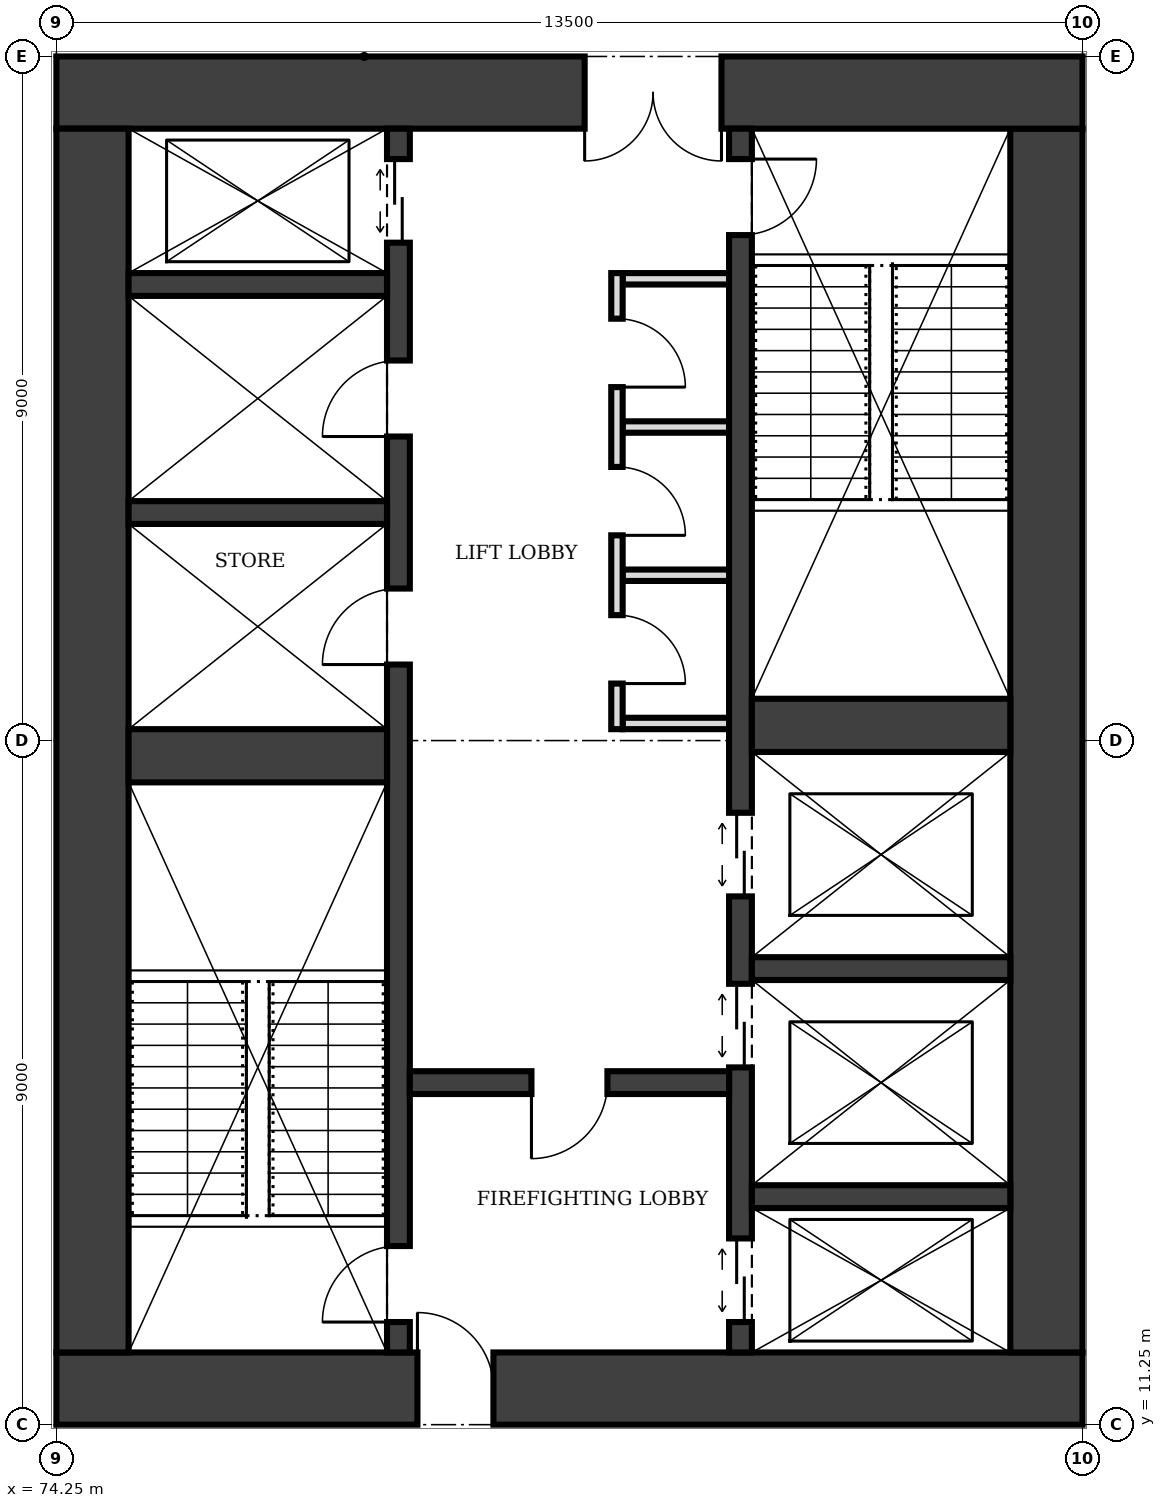
"""IFC4 building model, lengths in metres.
Left out: names, types, materials, properties, quantities, classifications, styles, units other than length and angle.
Written with IfcOpenShell. Run it as: python <this file> out.ifc"""

import sys

from ifc_helpers import new_model, si_unit, direction, frame, frame_2d, origin, place, context, subcontext, project, spatial, rectangle, extrude, element, fill, save


model = new_model("IFC4")
c1 = context("Model", 3, precision=1e-05, world=origin(), true_north=direction((0.0, 1.0)))
c2 = subcontext(c1, "Body", "Model", "MODEL_VIEW")
j1 = project(units=[si_unit("LENGTHUNIT", "METRE"), si_unit("PLANEANGLEUNIT", "RADIAN")], contexts=[c1])
p1 = place(None, origin())
s1 = spatial("IfcSite", under=j1, at=p1, CompositionType="ELEMENT")
p2 = place(p1, origin())
s2 = spatial("IfcBuilding", under=s1, at=p2, CompositionType="ELEMENT")
p3 = place(p2, frame((0.0, 0.0, 121.0)))
s3 = spatial("IfcBuildingStorey", under=s2, at=p3, CompositionType="ELEMENT", Elevation=121.0)
p4 = place(p3, frame((74.25, 11.725, 0.0), z_axis=(0.0, 0.0, 1.0), x_axis=(1.0, 0.0, 0.0)))
e1 = element("IfcWall", 1, at=p4, inside=s3, PredefinedType="SHEAR", context=c2, shape_type="SweptSolid", body=[
    extrude(rectangle(XDim=13.5, YDim=0.95, at=frame_2d((6.75, 0.0))), origin(), (0.0, 0.0, 1.0), 4.0),
])
p5 = place(p4, frame((4.75, 0.0, 0.0)))
e2 = element("IfcOpeningElement", 2, at=p5, cuts=e1, PredefinedType="OPENING", context=c2, shape_type="SweptSolid", body=[
    extrude(rectangle(XDim=1.0, YDim=2.1, at=frame_2d((0.5, 1.05))), frame((0.0, 0.485, 0.0), z_axis=(0.0, -1.0, 0.0), x_axis=(1.0, 0.0, 0.0)), (0.0, 0.0, 1.0), 0.97),
])
p6 = place(p3, frame((87.275, 12.2, 0.0), z_axis=(0.0, 0.0, 1.0), x_axis=(0.0, 1.0, 0.0)))
e3 = element("IfcWall", 3, at=p6, inside=s3, PredefinedType="SHEAR", context=c2, shape_type="SweptSolid", body=[
    extrude(rectangle(XDim=16.1, YDim=0.95, at=frame_2d((8.05, 0.0))), origin(), (0.0, 0.0, 1.0), 4.0),
])
p7 = place(p3, frame((87.75, 28.775, 0.0), z_axis=(0.0, 0.0, 1.0), x_axis=(-1.0, 0.0, 0.0)))
e4 = element("IfcWall", 4, at=p7, inside=s3, PredefinedType="SHEAR", context=c2, shape_type="SweptSolid", body=[
    extrude(rectangle(XDim=13.5, YDim=0.95, at=frame_2d((6.75, 0.0))), origin(), (0.0, 0.0, 1.0), 4.0),
])
p8 = place(p7, frame((4.75, 0.0, 0.0)))
e5 = element("IfcOpeningElement", 5, at=p8, cuts=e4, PredefinedType="OPENING", context=c2, shape_type="SweptSolid", body=[
    extrude(rectangle(XDim=1.8, YDim=2.1, at=frame_2d((0.9, 1.05))), frame((0.0, 0.485, 0.0), z_axis=(0.0, -1.0, 0.0), x_axis=(1.0, 0.0, 0.0)), (0.0, 0.0, 1.0), 0.97),
])
p9 = place(p3, frame((74.725, 28.3, 0.0), z_axis=(0.0, 0.0, 1.0), x_axis=(0.0, -1.0, 0.0)))
e6 = element("IfcWall", 6, at=p9, inside=s3, PredefinedType="SHEAR", context=c2, shape_type="SweptSolid", body=[
    extrude(rectangle(XDim=16.1, YDim=0.95, at=frame_2d((8.05, 0.0))), origin(), (0.0, 0.0, 1.0), 4.0),
])
p10 = place(p3, frame((78.75, 12.2, 0.0), z_axis=(0.0, 0.0, 1.0), x_axis=(0.0, 1.0, 0.0)))
e7 = element("IfcWall", 7, at=p10, inside=s3, PredefinedType="SHEAR", context=c2, shape_type="SweptSolid", body=[
    extrude(rectangle(XDim=16.1, YDim=0.3, at=frame_2d((8.05, 0.0))), origin(), (0.0, 0.0, 1.0), 4.0),
])
p11 = place(p10, frame((0.4, 0.0, 0.0)))
e8 = element("IfcOpeningElement", 8, at=p11, cuts=e7, PredefinedType="OPENING", context=c2, shape_type="SweptSolid", body=[
    extrude(rectangle(XDim=1.0, YDim=2.1, at=frame_2d((0.5, 1.05))), frame((0.0, 0.16, 0.0), z_axis=(0.0, -1.0, 0.0), x_axis=(1.0, 0.0, 0.0)), (0.0, 0.0, 1.0), 0.32),
])
p12 = place(p10, frame((14.6, 0.0, 0.0)))
e9 = element("IfcOpeningElement", 9, at=p12, cuts=e7, PredefinedType="OPENING", context=c2, shape_type="SweptSolid", body=[
    extrude(rectangle(XDim=1.1, YDim=2.1, at=frame_2d((0.55, 1.05))), frame((0.0, 0.16, 0.0), z_axis=(0.0, -1.0, 0.0), x_axis=(1.0, 0.0, 0.0)), (0.0, 0.0, 1.0), 0.32),
])
p13 = place(p10, frame((9.05, 0.0, 0.0)))
e10 = element("IfcOpeningElement", 10, at=p13, cuts=e7, PredefinedType="OPENING", context=c2, shape_type="SweptSolid", body=[
    extrude(rectangle(XDim=1.0, YDim=2.1, at=frame_2d((0.5, 1.05))), frame((0.0, 0.16, 0.0), z_axis=(0.0, -1.0, 0.0), x_axis=(1.0, 0.0, 0.0)), (0.0, 0.0, 1.0), 0.32),
])
p14 = place(p10, frame((12.05, 0.0, 0.0)))
e11 = element("IfcOpeningElement", 11, at=p14, cuts=e7, PredefinedType="OPENING", context=c2, shape_type="SweptSolid", body=[
    extrude(rectangle(XDim=1.0, YDim=2.1, at=frame_2d((0.5, 1.05))), frame((0.0, 0.16, 0.0), z_axis=(0.0, -1.0, 0.0), x_axis=(1.0, 0.0, 0.0)), (0.0, 0.0, 1.0), 0.32),
])
p15 = place(p3, frame((83.25, 12.2, 0.0), z_axis=(0.0, 0.0, 1.0), x_axis=(0.0, 1.0, 0.0)))
e12 = element("IfcWall", 12, at=p15, inside=s3, PredefinedType="SHEAR", context=c2, shape_type="SweptSolid", body=[
    extrude(rectangle(XDim=16.1, YDim=0.3, at=frame_2d((8.05, 0.0))), origin(), (0.0, 0.0, 1.0), 4.0),
])
p16 = place(p15, frame((14.7, 0.0, 0.0)))
e13 = element("IfcOpeningElement", 13, at=p16, cuts=e12, PredefinedType="OPENING", context=c2, shape_type="SweptSolid", body=[
    extrude(rectangle(XDim=1.0, YDim=2.1, at=frame_2d((0.5, 1.05))), frame((0.0, 0.16, 0.0), z_axis=(0.0, -1.0, 0.0), x_axis=(1.0, 0.0, 0.0)), (0.0, 0.0, 1.0), 0.32),
])
p17 = place(p15, frame((0.4, 0.0, 0.0)))
e14 = element("IfcOpeningElement", 14, at=p17, cuts=e12, PredefinedType="OPENING", context=c2, shape_type="SweptSolid", body=[
    extrude(rectangle(XDim=1.1, YDim=2.1, at=frame_2d((0.55, 1.05))), frame((0.0, 0.16, 0.0), z_axis=(0.0, -1.0, 0.0), x_axis=(1.0, 0.0, 0.0)), (0.0, 0.0, 1.0), 0.32),
])
p18 = place(p15, frame((3.75, 0.0, 0.0)))
e15 = element("IfcOpeningElement", 15, at=p18, cuts=e12, PredefinedType="OPENING", context=c2, shape_type="SweptSolid", body=[
    extrude(rectangle(XDim=1.1, YDim=2.1, at=frame_2d((0.55, 1.05))), frame((0.0, 0.16, 0.0), z_axis=(0.0, -1.0, 0.0), x_axis=(1.0, 0.0, 0.0)), (0.0, 0.0, 1.0), 0.32),
])
p19 = place(p15, frame((6.0, 0.0, 0.0)))
e16 = element("IfcOpeningElement", 16, at=p19, cuts=e12, PredefinedType="OPENING", context=c2, shape_type="SweptSolid", body=[
    extrude(rectangle(XDim=1.1, YDim=2.1, at=frame_2d((0.55, 1.05))), frame((0.0, 0.16, 0.0), z_axis=(0.0, -1.0, 0.0), x_axis=(1.0, 0.0, 0.0)), (0.0, 0.0, 1.0), 0.32),
])
p20 = place(p3, frame((75.2, 20.05, 0.0), z_axis=(0.0, 0.0, 1.0), x_axis=(1.0, 0.0, 0.0)))
e17 = element("IfcWall", 17, at=p20, inside=s3, PredefinedType="SHEAR", context=c2, shape_type="SweptSolid", body=[
    extrude(rectangle(XDim=3.4, YDim=0.7, at=frame_2d((1.7, 0.0))), origin(), (0.0, 0.0, 1.0), 4.0),
])
p21 = place(p3, frame((78.9, 15.75, 0.0), z_axis=(0.0, 0.0, 1.0), x_axis=(1.0, 0.0, 0.0)))
e18 = element("IfcWall", 18, at=p21, inside=s3, PredefinedType="SHEAR", context=c2, shape_type="SweptSolid", body=[
    extrude(rectangle(XDim=4.2, YDim=0.3, at=frame_2d((2.1, 0.0))), origin(), (0.0, 0.0, 1.0), 4.0),
])
p22 = place(p21, frame((1.6, 0.0, 0.0)))
e19 = element("IfcOpeningElement", 19, at=p22, cuts=e18, PredefinedType="OPENING", context=c2, shape_type="SweptSolid", body=[
    extrude(rectangle(XDim=1.0, YDim=2.1, at=frame_2d((0.5, 1.05))), frame((0.0, 0.16, 0.0), z_axis=(0.0, -1.0, 0.0), x_axis=(1.0, 0.0, 0.0)), (0.0, 0.0, 1.0), 0.32),
])
for number, where, z_axis, x_axis in (
    (20, (83.4, 14.25, 0.0), (0.0, 0.0, 1.0), (1.0, 0.0, 0.0)),
    (21, (83.4, 17.25, 0.0), (0.0, 0.0, 1.0), (1.0, 0.0, 0.0)),
):
    element("IfcWall", number, at=place(p3, frame(where, z_axis=z_axis, x_axis=x_axis)), inside=s3, PredefinedType="SHEAR", context=c2, shape_type="SweptSolid", body=[
        extrude(rectangle(XDim=3.4, YDim=0.3, at=frame_2d((1.7, 0.0))), origin(), (0.0, 0.0, 1.0), 4.0),
    ])
p23 = place(p3, frame((83.4, 20.45, 0.0), z_axis=(0.0, 0.0, 1.0), x_axis=(1.0, 0.0, 0.0)))
e22 = element("IfcWall", 22, at=p23, inside=s3, PredefinedType="SHEAR", context=c2, shape_type="SweptSolid", body=[
    extrude(rectangle(XDim=3.4, YDim=0.7, at=frame_2d((1.7, 0.0))), origin(), (0.0, 0.0, 1.0), 4.0),
])
for number, where, z_axis, x_axis in (
    (23, (75.2, 23.25, 0.0), (0.0, 0.0, 1.0), (1.0, 0.0, 0.0)),
    (24, (75.2, 26.25, 0.0), (0.0, 0.0, 1.0), (1.0, 0.0, 0.0)),
):
    element("IfcWall", number, at=place(p3, frame(where, z_axis=z_axis, x_axis=x_axis)), inside=s3, PredefinedType="SHEAR", context=c2, shape_type="SweptSolid", body=[
        extrude(rectangle(XDim=3.4, YDim=0.3, at=frame_2d((1.7, 0.0))), origin(), (0.0, 0.0, 1.0), 4.0),
    ])
p24 = place(p3, frame((81.625, 20.4, 0.0), z_axis=(0.0, 0.0, 1.0), x_axis=(0.0, 1.0, 0.0)))
e25 = element("IfcWall", 25, at=p24, inside=s3, PredefinedType="PARTITIONING", context=c2, shape_type="SweptSolid", body=[
    extrude(rectangle(XDim=6.0, YDim=0.15, at=frame_2d((3.0, 0.0))), origin(), (0.0, 0.0, 1.0), 3.75),
])
p25 = place(p24, frame((0.6, 0.0, 0.0)))
e26 = element("IfcOpeningElement", 26, at=p25, cuts=e25, PredefinedType="OPENING", context=c2, shape_type="SweptSolid", body=[
    extrude(rectangle(XDim=0.9, YDim=2.1, at=frame_2d((0.45, 1.05))), frame((0.0, 0.085, 0.0), z_axis=(0.0, -1.0, 0.0), x_axis=(1.0, 0.0, 0.0)), (0.0, 0.0, 1.0), 0.17),
])
p26 = place(p24, frame((2.55, 0.0, 0.0)))
e27 = element("IfcOpeningElement", 27, at=p26, cuts=e25, PredefinedType="OPENING", context=c2, shape_type="SweptSolid", body=[
    extrude(rectangle(XDim=0.9, YDim=2.1, at=frame_2d((0.45, 1.05))), frame((0.0, 0.085, 0.0), z_axis=(0.0, -1.0, 0.0), x_axis=(1.0, 0.0, 0.0)), (0.0, 0.0, 1.0), 0.17),
])
p27 = place(p24, frame((4.5, 0.0, 0.0)))
e28 = element("IfcOpeningElement", 28, at=p27, cuts=e25, PredefinedType="OPENING", context=c2, shape_type="SweptSolid", body=[
    extrude(rectangle(XDim=0.9, YDim=2.1, at=frame_2d((0.45, 1.05))), frame((0.0, 0.085, 0.0), z_axis=(0.0, -1.0, 0.0), x_axis=(1.0, 0.0, 0.0)), (0.0, 0.0, 1.0), 0.17),
])
for number, where, z_axis, x_axis in (
    (29, (81.7, 20.475, 0.0), (0.0, 0.0, 1.0), (1.0, 0.0, 0.0)),
    (30, (81.7, 22.425, 0.0), (0.0, 0.0, 1.0), (1.0, 0.0, 0.0)),
    (31, (81.7, 24.375, 0.0), (0.0, 0.0, 1.0), (1.0, 0.0, 0.0)),
    (32, (81.7, 26.325, 0.0), (0.0, 0.0, 1.0), (1.0, 0.0, 0.0)),
):
    element("IfcWall", number, at=place(p3, frame(where, z_axis=z_axis, x_axis=x_axis)), inside=s3, PredefinedType="PARTITIONING", context=c2, shape_type="SweptSolid", body=[
        extrude(rectangle(XDim=1.4, YDim=0.15, at=frame_2d((0.7, 0.0))), origin(), (0.0, 0.0, 1.0), 3.75),
    ])
p28 = place(p5, origin())
e33 = element("IfcDoor", 33, at=p28, inside=s3, OperationType="SINGLE_SWING_LEFT", PredefinedType="DOOR", context=c2, shape_type="SweptSolid", body=[
    extrude(rectangle(XDim=1.0, YDim=2.1, at=frame_2d((0.5, 1.05))), frame((0.0, 0.025, 0.0), z_axis=(0.0, -1.0, 0.0), x_axis=(1.0, 0.0, 0.0)), (0.0, 0.0, 1.0), 0.05),
])
fill(e2, e33)
p29 = place(p8, origin())
e34 = element("IfcDoor", 34, at=p29, inside=s3, OperationType="DOUBLE_DOOR_SINGLE_SWING", PredefinedType="DOOR", context=c2, shape_type="SweptSolid", body=[
    extrude(rectangle(XDim=1.8, YDim=2.1, at=frame_2d((0.9, 1.05))), frame((0.0, 0.025, 0.0), z_axis=(0.0, -1.0, 0.0), x_axis=(1.0, 0.0, 0.0)), (0.0, 0.0, 1.0), 0.05),
])
fill(e5, e34)
p30 = place(p22, frame((1.0, 0.0, 0.0), z_axis=(0.0, 0.0, 1.0), x_axis=(-1.0, 0.0, 0.0)))
e35 = element("IfcDoor", 35, at=p30, inside=s3, OperationType="SINGLE_SWING_RIGHT", PredefinedType="DOOR", context=c2, shape_type="SweptSolid", body=[
    extrude(rectangle(XDim=1.0, YDim=2.1, at=frame_2d((0.5, 1.05))), frame((0.0, 0.025, 0.0), z_axis=(0.0, -1.0, 0.0), x_axis=(1.0, 0.0, 0.0)), (0.0, 0.0, 1.0), 0.05),
])
fill(e19, e35)
p31 = place(p11, origin())
e36 = element("IfcDoor", 36, at=p31, inside=s3, OperationType="SINGLE_SWING_LEFT", PredefinedType="DOOR", context=c2, shape_type="SweptSolid", body=[
    extrude(rectangle(XDim=1.0, YDim=2.1, at=frame_2d((0.5, 1.05))), frame((0.0, 0.025, 0.0), z_axis=(0.0, -1.0, 0.0), x_axis=(1.0, 0.0, 0.0)), (0.0, 0.0, 1.0), 0.05),
])
fill(e8, e36)
p32 = place(p16, frame((1.0, 0.0, 0.0), z_axis=(0.0, 0.0, 1.0), x_axis=(-1.0, 0.0, 0.0)))
e37 = element("IfcDoor", 37, at=p32, inside=s3, OperationType="SINGLE_SWING_LEFT", PredefinedType="DOOR", context=c2, shape_type="SweptSolid", body=[
    extrude(rectangle(XDim=1.0, YDim=2.1, at=frame_2d((0.5, 1.05))), frame((0.0, 0.025, 0.0), z_axis=(0.0, -1.0, 0.0), x_axis=(1.0, 0.0, 0.0)), (0.0, 0.0, 1.0), 0.05),
])
fill(e13, e37)
p33 = place(p17, origin())
e38 = element("IfcDoor", 38, at=p33, inside=s3, OperationType="DOUBLE_DOOR_SLIDING", PredefinedType="DOOR", context=c2, shape_type="SweptSolid", body=[
    extrude(rectangle(XDim=1.1, YDim=2.1, at=frame_2d((0.55, 1.05))), frame((0.0, 0.025, 0.0), z_axis=(0.0, -1.0, 0.0), x_axis=(1.0, 0.0, 0.0)), (0.0, 0.0, 1.0), 0.05),
])
fill(e14, e38)
p34 = place(p12, origin())
e39 = element("IfcDoor", 39, at=p34, inside=s3, OperationType="DOUBLE_DOOR_SLIDING", PredefinedType="DOOR", context=c2, shape_type="SweptSolid", body=[
    extrude(rectangle(XDim=1.1, YDim=2.1, at=frame_2d((0.55, 1.05))), frame((0.0, 0.025, 0.0), z_axis=(0.0, -1.0, 0.0), x_axis=(1.0, 0.0, 0.0)), (0.0, 0.0, 1.0), 0.05),
])
fill(e9, e39)
p35 = place(p18, origin())
e40 = element("IfcDoor", 40, at=p35, inside=s3, OperationType="DOUBLE_DOOR_SLIDING", PredefinedType="DOOR", context=c2, shape_type="SweptSolid", body=[
    extrude(rectangle(XDim=1.1, YDim=2.1, at=frame_2d((0.55, 1.05))), frame((0.0, 0.025, 0.0), z_axis=(0.0, -1.0, 0.0), x_axis=(1.0, 0.0, 0.0)), (0.0, 0.0, 1.0), 0.05),
])
fill(e15, e40)
p36 = place(p19, origin())
e41 = element("IfcDoor", 41, at=p36, inside=s3, OperationType="DOUBLE_DOOR_SLIDING", PredefinedType="DOOR", context=c2, shape_type="SweptSolid", body=[
    extrude(rectangle(XDim=1.1, YDim=2.1, at=frame_2d((0.55, 1.05))), frame((0.0, 0.025, 0.0), z_axis=(0.0, -1.0, 0.0), x_axis=(1.0, 0.0, 0.0)), (0.0, 0.0, 1.0), 0.05),
])
fill(e16, e41)
p37 = place(p25, frame((0.9, 0.0, 0.0), z_axis=(0.0, 0.0, 1.0), x_axis=(-1.0, 0.0, 0.0)))
e42 = element("IfcDoor", 42, at=p37, inside=s3, OperationType="SINGLE_SWING_RIGHT", PredefinedType="DOOR", context=c2, shape_type="SweptSolid", body=[
    extrude(rectangle(XDim=0.9, YDim=2.1, at=frame_2d((0.45, 1.05))), frame((0.0, 0.025, 0.0), z_axis=(0.0, -1.0, 0.0), x_axis=(1.0, 0.0, 0.0)), (0.0, 0.0, 1.0), 0.05),
])
fill(e26, e42)
p38 = place(p26, frame((0.9, 0.0, 0.0), z_axis=(0.0, 0.0, 1.0), x_axis=(-1.0, 0.0, 0.0)))
e43 = element("IfcDoor", 43, at=p38, inside=s3, OperationType="SINGLE_SWING_RIGHT", PredefinedType="DOOR", context=c2, shape_type="SweptSolid", body=[
    extrude(rectangle(XDim=0.9, YDim=2.1, at=frame_2d((0.45, 1.05))), frame((0.0, 0.025, 0.0), z_axis=(0.0, -1.0, 0.0), x_axis=(1.0, 0.0, 0.0)), (0.0, 0.0, 1.0), 0.05),
])
fill(e27, e43)
p39 = place(p27, frame((0.9, 0.0, 0.0), z_axis=(0.0, 0.0, 1.0), x_axis=(-1.0, 0.0, 0.0)))
e44 = element("IfcDoor", 44, at=p39, inside=s3, OperationType="SINGLE_SWING_RIGHT", PredefinedType="DOOR", context=c2, shape_type="SweptSolid", body=[
    extrude(rectangle(XDim=0.9, YDim=2.1, at=frame_2d((0.45, 1.05))), frame((0.0, 0.025, 0.0), z_axis=(0.0, -1.0, 0.0), x_axis=(1.0, 0.0, 0.0)), (0.0, 0.0, 1.0), 0.05),
])
fill(e28, e44)
p40 = place(p13, origin())
e45 = element("IfcDoor", 45, at=p40, inside=s3, OperationType="SINGLE_SWING_LEFT", PredefinedType="DOOR", context=c2, shape_type="SweptSolid", body=[
    extrude(rectangle(XDim=1.0, YDim=2.1, at=frame_2d((0.5, 1.05))), frame((0.0, 0.025, 0.0), z_axis=(0.0, -1.0, 0.0), x_axis=(1.0, 0.0, 0.0)), (0.0, 0.0, 1.0), 0.05),
])
fill(e10, e45)
p41 = place(p14, origin())
e46 = element("IfcDoor", 46, at=p41, inside=s3, OperationType="SINGLE_SWING_LEFT", PredefinedType="DOOR", context=c2, shape_type="SweptSolid", body=[
    extrude(rectangle(XDim=1.0, YDim=2.1, at=frame_2d((0.5, 1.05))), frame((0.0, 0.025, 0.0), z_axis=(0.0, -1.0, 0.0), x_axis=(1.0, 0.0, 0.0)), (0.0, 0.0, 1.0), 0.05),
])
fill(e11, e46)
save(model, sys.argv[1])
